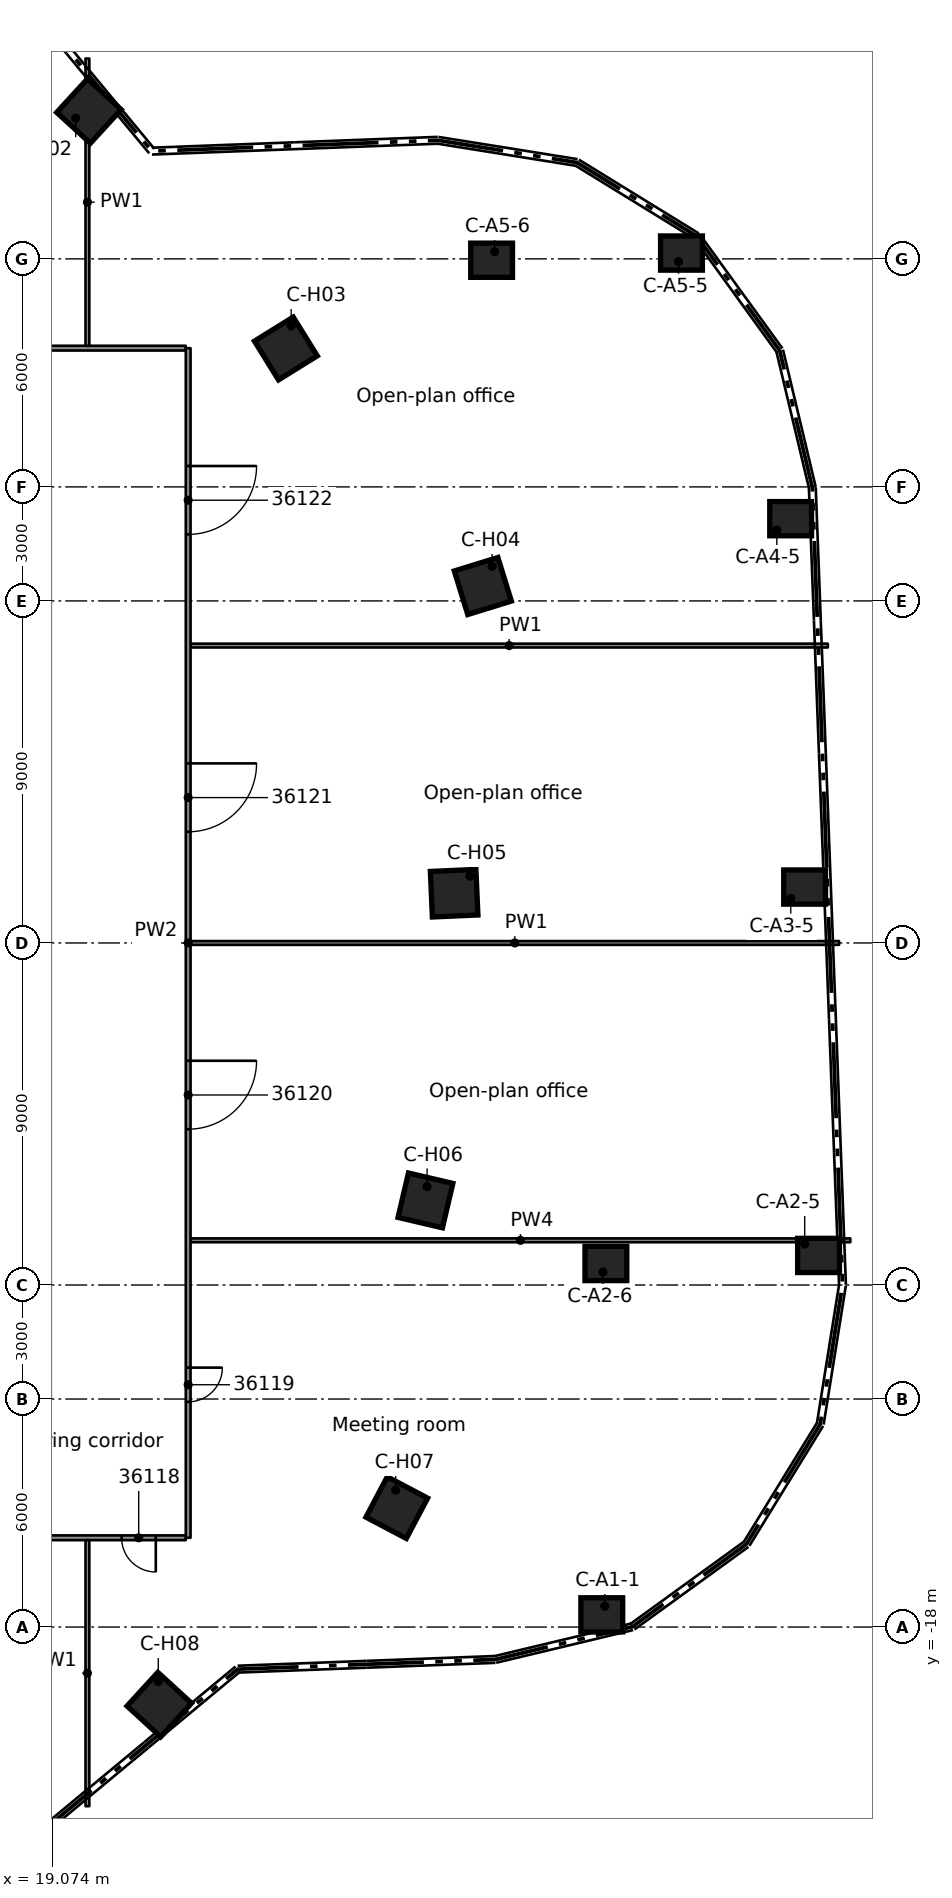
"""IFC4 building model, lengths in metres.
Left out: names, types, materials, properties, quantities, classifications, styles, units other than length and angle.
Written with IfcOpenShell. Run it as: python <this file> out.ifc"""

import sys

from ifc_helpers import new_model, si_unit, direction, frame, frame_2d, origin, origin_2d, place, context, subcontext, project, spatial, rectangle, extrude, element, fill, save


model = new_model("IFC4")
c1 = context("Model", 3, precision=1e-05, world=origin(), true_north=direction((0.0, 1.0)))
c2 = subcontext(c1, "Body", "Model", "MODEL_VIEW")
j1 = project(units=[si_unit("LENGTHUNIT", "METRE"), si_unit("PLANEANGLEUNIT", "RADIAN")], contexts=[c1])
p1 = place(None, origin())
s1 = spatial("IfcSite", under=j1, at=p1, CompositionType="ELEMENT")
p2 = place(p1, origin())
s2 = spatial("IfcBuilding", under=s1, at=p2, CompositionType="ELEMENT")
p3 = place(p2, frame((0.0, 0.0, 181.1)))
s3 = spatial("IfcBuildingStorey", under=s2, at=p3, CompositionType="ELEMENT", Elevation=181.1)
for number, where, z_axis, x_axis in (
    (1, (33.535, -17.679, 0.0), (0.0, 0.0, 1.0), (1.0, 0.0, 0.0)),
    (2, (39.239, -8.222, 0.0), (0.0, 0.0, 1.0), (1.0, 0.0, 0.0)),
    (3, (33.643, -8.434, 0.0), (0.0, 0.0, 1.0), (1.0, 0.0, 0.0)),
    (4, (38.872, 1.471, 0.0), (0.0, 0.0, 1.0), (1.0, 0.0, 0.0)),
    (5, (38.505, 11.164, 0.0), (0.0, 0.0, 1.0), (1.0, 0.0, 0.0)),
    (6, (35.632, 18.153, 0.0), (0.0, 0.0, 1.0), (1.0, 0.0, 0.0)),
    (7, (30.636, 17.964, 0.0), (0.0, 0.0, 1.0), (1.0, 0.0, 0.0)),
):
    element("IfcColumn", number, at=place(p3, frame(where, z_axis=z_axis, x_axis=x_axis)), inside=s3, PredefinedType="COLUMN", context=c2, shape_type="SweptSolid", body=[
        extrude(rectangle(XDim=1.1, YDim=0.9, at=origin_2d()), origin(), (0.0, 0.0, 1.0), 3.5),
    ])
for number, where, z_axis, x_axis in (
    (8, (20.04, 21.891, 0.0), (0.0, 0.0, 1.0), (0.675, 0.738, 0.0)),
    (9, (25.222, 15.642, 0.0), (0.0, 0.0, 1.0), (0.85, 0.527, 0.0)),
    (10, (30.405, 9.392, 0.0), (0.0, 0.0, 1.0), (0.955, 0.295, 0.0)),
    (11, (29.65, 1.309, 0.0), (0.0, 0.0, 1.0), (0.999, 0.044, 0.0)),
    (12, (28.895, -6.774, 0.0), (0.0, 0.0, 1.0), (0.974, -0.228, 0.0)),
    (13, (28.141, -14.858, 0.0), (0.0, 0.0, 1.0), (0.884, -0.467, 0.0)),
    (14, (21.891, -20.04, 0.0), (0.0, 0.0, 1.0), (0.738, -0.675, 0.0)),
):
    element("IfcColumn", number, at=place(p3, frame(where, z_axis=z_axis, x_axis=x_axis)), inside=s3, PredefinedType="COLUMN", context=c2, shape_type="SweptSolid", body=[
        extrude(rectangle(XDim=1.2, YDim=1.2, at=origin_2d()), origin(), (0.0, 0.0, 1.0), 3.5),
    ])
p4 = place(p3, frame((22.587, -15.651, 0.0), z_axis=(0.0, 0.0, 1.0), x_axis=(-1.0, 0.0, 0.0)))
e15 = element("IfcWall", 15, at=p4, inside=s3, PredefinedType="PARTITIONING", context=c2, shape_type="SweptSolid", body=[
    extrude(rectangle(XDim=10.427, YDim=0.125, at=frame_2d((5.213, 0.0))), origin(), (0.0, 0.0, 1.0), 3.06),
])
p5 = place(p4, frame((0.788, 0.0, 0.0)))
e16 = element("IfcOpeningElement", 16, at=p5, cuts=e15, PredefinedType="OPENING", context=c2, shape_type="SweptSolid", body=[
    extrude(rectangle(XDim=0.9, YDim=2.1, at=frame_2d((0.45, 1.05))), frame((0.0, 0.073, 0.0), z_axis=(0.0, -1.0, 0.0), x_axis=(1.0, 0.0, 0.0)), (0.0, 0.0, 1.0), 0.145),
])
p6 = place(p3, frame((22.713, -7.824, 0.0), z_axis=(0.0, 0.0, 1.0), x_axis=(1.0, 0.0, 0.0)))
e17 = element("IfcWall", 17, at=p6, inside=s3, PredefinedType="PARTITIONING", context=c2, shape_type="SweptSolid", body=[
    extrude(rectangle(XDim=17.362, YDim=0.1, at=frame_2d((8.681, 0.0))), origin(), (0.0, 0.0, 1.0), 2.425),
])
p7 = place(p3, frame((22.713, 0.0, 0.0), z_axis=(0.0, 0.0, 1.0), x_axis=(1.0, 0.0, 0.0)))
e18 = element("IfcWall", 18, at=p7, inside=s3, PredefinedType="PARTITIONING", context=c2, shape_type="SweptSolid", body=[
    extrude(rectangle(XDim=17.066, YDim=0.1, at=frame_2d((8.533, 0.0))), origin(), (0.0, 0.0, 1.0), 3.06),
])
p8 = place(p3, frame((22.713, 7.825, 0.0), z_axis=(0.0, 0.0, 1.0), x_axis=(1.0, 0.0, 0.0)))
e19 = element("IfcWall", 19, at=p8, inside=s3, PredefinedType="PARTITIONING", context=c2, shape_type="SweptSolid", body=[
    extrude(rectangle(XDim=16.77, YDim=0.1, at=frame_2d((8.385, 0.0))), origin(), (0.0, 0.0, 1.0), 3.06),
])
p9 = place(p3, frame((12.311, 15.651, 0.0), z_axis=(0.0, 0.0, 1.0), x_axis=(1.0, 0.0, 0.0)))
e20 = element("IfcWall", 20, at=p9, inside=s3, PredefinedType="PARTITIONING", context=c2, shape_type="SweptSolid", body=[
    extrude(rectangle(XDim=10.276, YDim=0.125, at=frame_2d((5.138, 0.0))), origin(), (0.0, 0.0, 1.0), 3.06),
])
p10 = place(p3, frame((22.651, 15.65, 0.0), z_axis=(0.0, 0.0, 1.0), x_axis=(0.0, -1.0, 0.0)))
e21 = element("IfcWall", 21, at=p10, inside=s3, PredefinedType="PARTITIONING", context=c2, shape_type="SweptSolid", body=[
    extrude(rectangle(XDim=31.3, YDim=0.125, at=frame_2d((15.65, 0.0))), origin(), (0.0, 0.0, 1.0), 3.06),
])
p11 = place(p10, frame((26.824, 0.0, 0.0)))
e22 = element("IfcOpeningElement", 22, at=p11, cuts=e21, PredefinedType="OPENING", context=c2, shape_type="SweptSolid", body=[
    extrude(rectangle(XDim=0.9, YDim=2.1, at=frame_2d((0.45, 1.05))), frame((0.0, 0.073, 0.0), z_axis=(0.0, -1.0, 0.0), x_axis=(1.0, 0.0, 0.0)), (0.0, 0.0, 1.0), 0.145),
])
p12 = place(p10, frame((18.75, 0.0, 0.0)))
e23 = element("IfcOpeningElement", 23, at=p12, cuts=e21, PredefinedType="OPENING", context=c2, shape_type="SweptSolid", body=[
    extrude(rectangle(XDim=1.8, YDim=2.1, at=frame_2d((0.9, 1.05))), frame((0.0, 0.073, 0.0), z_axis=(0.0, -1.0, 0.0), x_axis=(1.0, 0.0, 0.0)), (0.0, 0.0, 1.0), 0.145),
])
p13 = place(p10, frame((10.925, 0.0, 0.0)))
e24 = element("IfcOpeningElement", 24, at=p13, cuts=e21, PredefinedType="OPENING", context=c2, shape_type="SweptSolid", body=[
    extrude(rectangle(XDim=1.8, YDim=2.1, at=frame_2d((0.9, 1.05))), frame((0.0, 0.073, 0.0), z_axis=(0.0, -1.0, 0.0), x_axis=(1.0, 0.0, 0.0)), (0.0, 0.0, 1.0), 0.145),
])
p14 = place(p10, frame((3.1, 0.0, 0.0)))
e25 = element("IfcOpeningElement", 25, at=p14, cuts=e21, PredefinedType="OPENING", context=c2, shape_type="SweptSolid", body=[
    extrude(rectangle(XDim=1.8, YDim=2.1, at=frame_2d((0.9, 1.05))), frame((0.0, 0.073, 0.0), z_axis=(0.0, -1.0, 0.0), x_axis=(1.0, 0.0, 0.0)), (0.0, 0.0, 1.0), 0.145),
])
p15 = place(p3, frame((20.0, -22.713, 0.0), z_axis=(0.0, 0.0, 1.0), x_axis=(0.0, 1.0, 0.0)))
e26 = element("IfcWall", 26, at=p15, inside=s3, PredefinedType="PARTITIONING", context=c2, shape_type="SweptSolid", body=[
    extrude(rectangle(XDim=7.0, YDim=0.1, at=frame_2d((3.5, 0.0))), origin(), (0.0, 0.0, 1.0), 3.06),
])
p16 = place(p3, frame((20.0, 15.713, 0.0), z_axis=(0.0, 0.0, 1.0), x_axis=(0.0, 1.0, 0.0)))
e27 = element("IfcWall", 27, at=p16, inside=s3, PredefinedType="PARTITIONING", context=c2, shape_type="SweptSolid", body=[
    extrude(rectangle(XDim=7.558, YDim=0.1, at=frame_2d((3.779, 0.0))), origin(), (0.0, 0.0, 1.0), 3.06),
])
p17 = place(p5, origin())
e28 = element("IfcDoor", 28, at=p17, inside=s3, OperationType="SINGLE_SWING_LEFT", PredefinedType="DOOR", context=c2, shape_type="SweptSolid", body=[
    extrude(rectangle(XDim=0.9, YDim=2.1, at=frame_2d((0.45, 1.05))), frame((0.0, 0.025, 0.0), z_axis=(0.0, -1.0, 0.0), x_axis=(1.0, 0.0, 0.0)), (0.0, 0.0, 1.0), 0.05),
])
fill(e16, e28)
p18 = place(p11, origin())
e29 = element("IfcDoor", 29, at=p18, inside=s3, OperationType="SINGLE_SWING_RIGHT", PredefinedType="DOOR", context=c2, shape_type="SweptSolid", body=[
    extrude(rectangle(XDim=0.9, YDim=2.1, at=frame_2d((0.45, 1.05))), frame((0.0, 0.025, 0.0), z_axis=(0.0, -1.0, 0.0), x_axis=(1.0, 0.0, 0.0)), (0.0, 0.0, 1.0), 0.05),
])
fill(e22, e29)
p19 = place(p12, origin())
e30 = element("IfcDoor", 30, at=p19, inside=s3, OperationType="DOUBLE_DOOR_SINGLE_SWING", PredefinedType="DOOR", context=c2, shape_type="SweptSolid", body=[
    extrude(rectangle(XDim=1.8, YDim=2.1, at=frame_2d((0.9, 1.05))), frame((0.0, 0.025, 0.0), z_axis=(0.0, -1.0, 0.0), x_axis=(1.0, 0.0, 0.0)), (0.0, 0.0, 1.0), 0.05),
])
fill(e23, e30)
p20 = place(p13, origin())
e31 = element("IfcDoor", 31, at=p20, inside=s3, OperationType="DOUBLE_DOOR_SINGLE_SWING", PredefinedType="DOOR", context=c2, shape_type="SweptSolid", body=[
    extrude(rectangle(XDim=1.8, YDim=2.1, at=frame_2d((0.9, 1.05))), frame((0.0, 0.025, 0.0), z_axis=(0.0, -1.0, 0.0), x_axis=(1.0, 0.0, 0.0)), (0.0, 0.0, 1.0), 0.05),
])
fill(e24, e31)
p21 = place(p14, origin())
e32 = element("IfcDoor", 32, at=p21, inside=s3, OperationType="DOUBLE_DOOR_SINGLE_SWING", PredefinedType="DOOR", context=c2, shape_type="SweptSolid", body=[
    extrude(rectangle(XDim=1.8, YDim=2.1, at=frame_2d((0.9, 1.05))), frame((0.0, 0.025, 0.0), z_axis=(0.0, -1.0, 0.0), x_axis=(1.0, 0.0, 0.0)), (0.0, 0.0, 1.0), 0.05),
])
fill(e25, e32)
save(model, sys.argv[1])
